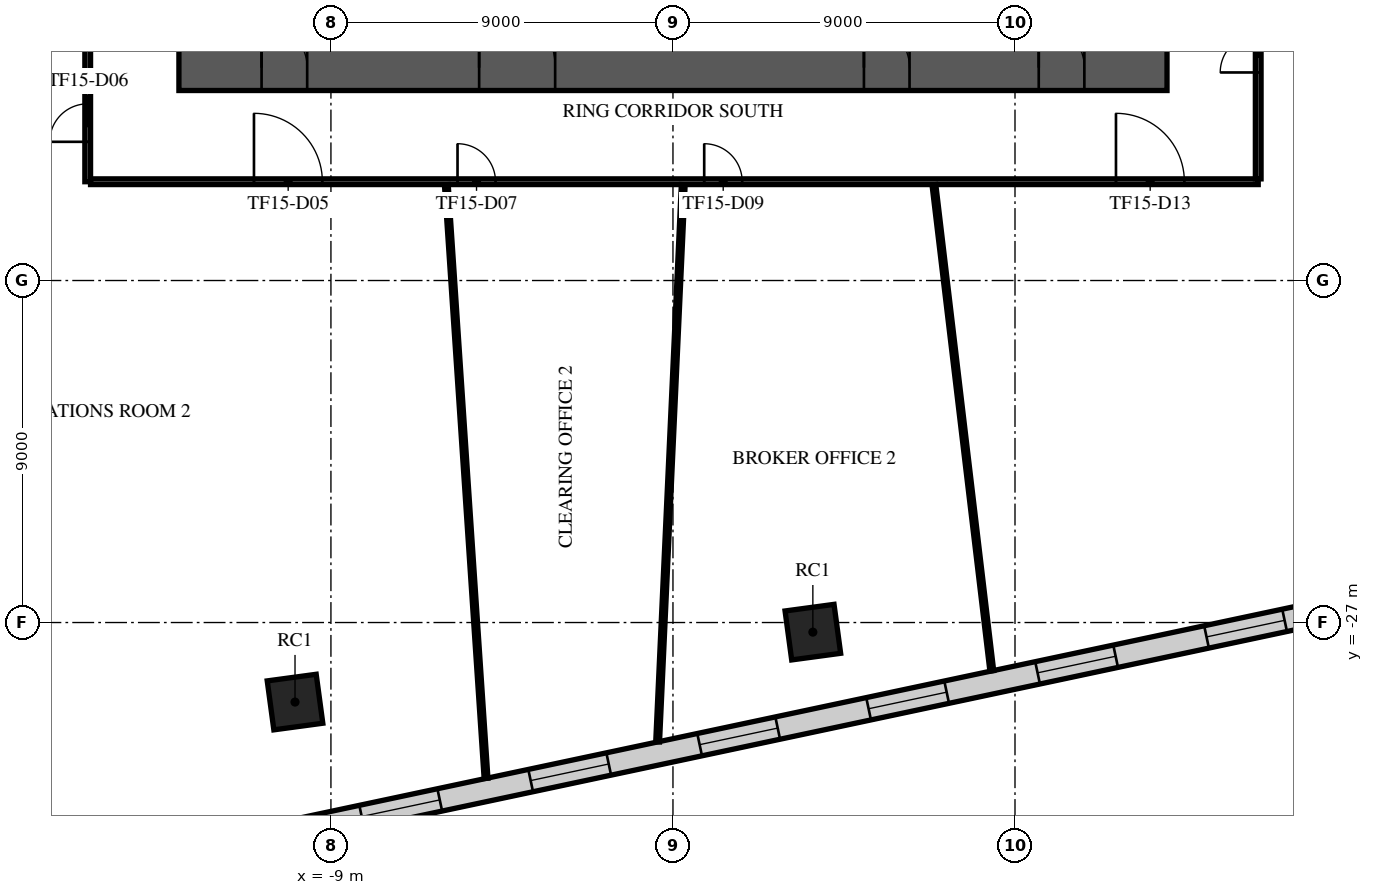
"""IFC4 building model, lengths in metres.
Left out: names, types, materials, properties, quantities, classifications, styles, units other than length and angle.
Written with IfcOpenShell. Run it as: python <this file> out.ifc"""

import sys

from ifc_helpers import new_model, si_unit, direction, frame, frame_2d, origin, origin_2d, place, context, subcontext, project, spatial, rectangle, extrude, element, fill, save


model = new_model("IFC4")
c1 = context("Model", 3, precision=1e-05, world=origin(), true_north=direction((0.0, 1.0)))
c2 = subcontext(c1, "Body", "Model", "MODEL_VIEW")
j1 = project(units=[si_unit("LENGTHUNIT", "METRE"), si_unit("PLANEANGLEUNIT", "RADIAN")], contexts=[c1])
p1 = place(None, origin())
s1 = spatial("IfcSite", under=j1, at=p1, CompositionType="ELEMENT")
p2 = place(p1, origin())
s2 = spatial("IfcBuilding", under=s1, at=p2, CompositionType="ELEMENT")
p3 = place(p2, frame((0.0, 0.0, 68.1)))
s3 = spatial("IfcBuildingStorey", under=s2, at=p3, CompositionType="ELEMENT", Elevation=68.1)
for number, where, z_axis, x_axis in (
    (1, (-9.945, -29.093, 0.0), (0.0, 0.0, 1.0), (0.991, 0.134, 0.0)),
    (2, (3.681, -27.253, 0.0), (0.0, 0.0, 1.0), (0.991, 0.134, 0.0)),
):
    element("IfcColumn", number, at=place(p3, frame(where, z_axis=z_axis, x_axis=x_axis)), inside=s3, PredefinedType="COLUMN", context=c2, shape_type="SweptSolid", body=[
        extrude(rectangle(XDim=1.3, YDim=1.3, at=origin_2d()), origin(), (0.0, 0.0, 1.0), 4.2),
    ])
p4 = place(p3, frame((-13.0, -12.4, 0.0), z_axis=(0.0, 0.0, 1.0), x_axis=(1.0, 0.0, 0.0)))
e3 = element("IfcWall", 3, at=p4, inside=s3, PredefinedType="SHEAR", context=c2, shape_type="SweptSolid", body=[
    extrude(rectangle(XDim=26.0, YDim=1.2, at=frame_2d((13.0, 0.0))), origin(), (0.0, 0.0, 1.0), 3.75),
])
p5 = place(p4, frame((7.9, 0.0, 0.0)))
e4 = element("IfcOpeningElement", 4, at=p5, cuts=e3, PredefinedType="OPENING", context=c2, shape_type="SweptSolid", body=[
    extrude(rectangle(XDim=2.0, YDim=2.1, at=frame_2d((1.0, 1.05))), frame((0.0, 0.61, 0.0), z_axis=(0.0, -1.0, 0.0), x_axis=(1.0, 0.0, 0.0)), (0.0, 0.0, 1.0), 1.22),
])
p6 = place(p4, frame((18.025, 0.0, 0.0)))
e5 = element("IfcOpeningElement", 5, at=p6, cuts=e3, PredefinedType="OPENING", context=c2, shape_type="SweptSolid", body=[
    extrude(rectangle(XDim=1.2, YDim=2.1, at=frame_2d((0.6, 1.05))), frame((0.0, 0.61, 0.0), z_axis=(0.0, -1.0, 0.0), x_axis=(1.0, 0.0, 0.0)), (0.0, 0.0, 1.0), 1.22),
])
p7 = place(p4, frame((2.175, 0.0, 0.0)))
e6 = element("IfcOpeningElement", 6, at=p7, cuts=e3, PredefinedType="OPENING", context=c2, shape_type="SweptSolid", body=[
    extrude(rectangle(XDim=1.2, YDim=2.1, at=frame_2d((0.6, 1.05))), frame((0.0, 0.61, 0.0), z_axis=(0.0, -1.0, 0.0), x_axis=(1.0, 0.0, 0.0)), (0.0, 0.0, 1.0), 1.22),
])
p8 = place(p4, frame((22.625, 0.0, 0.0)))
e7 = element("IfcOpeningElement", 7, at=p8, cuts=e3, PredefinedType="OPENING", context=c2, shape_type="SweptSolid", body=[
    extrude(rectangle(XDim=1.2, YDim=2.1, at=frame_2d((0.6, 1.05))), frame((0.0, 0.61, 0.0), z_axis=(0.0, -1.0, 0.0), x_axis=(1.0, 0.0, 0.0)), (0.0, 0.0, 1.0), 1.22),
])
p9 = place(p3, frame((-18.157, -34.223, 0.0), z_axis=(0.0, 0.0, 1.0), x_axis=(0.97814728825, 0.207913160934, 0.0)))
e8 = element("IfcWall", 8, at=p9, inside=s3, PredefinedType="STANDARD", context=c2, shape_type="SweptSolid", body=[
    extrude(rectangle(XDim=49.751, YDim=0.6, at=frame_2d((24.876, 0.0))), origin(), (0.0, 0.0, 1.0), 3.75),
])
p10 = place(p9, frame((1.161, 0.0, 0.9)))
e9 = element("IfcOpeningElement", 9, at=p10, cuts=e8, PredefinedType="OPENING", context=c2, shape_type="SweptSolid", body=[
    extrude(rectangle(XDim=2.1, YDim=2.1, at=frame_2d((1.05, 1.05))), frame((0.0, 0.31, 0.0), z_axis=(0.0, -1.0, 0.0), x_axis=(1.0, 0.0, 0.0)), (0.0, 0.0, 1.0), 0.62),
])
p11 = place(p9, frame((5.644, 0.0, 0.9)))
e10 = element("IfcOpeningElement", 10, at=p11, cuts=e8, PredefinedType="OPENING", context=c2, shape_type="SweptSolid", body=[
    extrude(rectangle(XDim=2.1, YDim=2.1, at=frame_2d((1.05, 1.05))), frame((0.0, 0.31, 0.0), z_axis=(0.0, -1.0, 0.0), x_axis=(1.0, 0.0, 0.0)), (0.0, 0.0, 1.0), 0.62),
])
p12 = place(p9, frame((10.189, 0.0, 0.9)))
e11 = element("IfcOpeningElement", 11, at=p12, cuts=e8, PredefinedType="OPENING", context=c2, shape_type="SweptSolid", body=[
    extrude(rectangle(XDim=2.1, YDim=2.1, at=frame_2d((1.05, 1.05))), frame((0.0, 0.31, 0.0), z_axis=(0.0, -1.0, 0.0), x_axis=(1.0, 0.0, 0.0)), (0.0, 0.0, 1.0), 0.62),
])
p13 = place(p9, frame((14.735, 0.0, 0.9)))
e12 = element("IfcOpeningElement", 12, at=p13, cuts=e8, PredefinedType="OPENING", context=c2, shape_type="SweptSolid", body=[
    extrude(rectangle(XDim=2.1, YDim=2.1, at=frame_2d((1.05, 1.05))), frame((0.0, 0.31, 0.0), z_axis=(0.0, -1.0, 0.0), x_axis=(1.0, 0.0, 0.0)), (0.0, 0.0, 1.0), 0.62),
])
p14 = place(p9, frame((19.28, 0.0, 0.9)))
e13 = element("IfcOpeningElement", 13, at=p14, cuts=e8, PredefinedType="OPENING", context=c2, shape_type="SweptSolid", body=[
    extrude(rectangle(XDim=2.1, YDim=2.1, at=frame_2d((1.05, 1.05))), frame((0.0, 0.31, 0.0), z_axis=(0.0, -1.0, 0.0), x_axis=(1.0, 0.0, 0.0)), (0.0, 0.0, 1.0), 0.62),
])
p15 = place(p9, frame((23.826, 0.0, 0.9)))
e14 = element("IfcOpeningElement", 14, at=p15, cuts=e8, PredefinedType="OPENING", context=c2, shape_type="SweptSolid", body=[
    extrude(rectangle(XDim=2.1, YDim=2.1, at=frame_2d((1.05, 1.05))), frame((0.0, 0.31, 0.0), z_axis=(0.0, -1.0, 0.0), x_axis=(1.0, 0.0, 0.0)), (0.0, 0.0, 1.0), 0.62),
])
p16 = place(p9, frame((28.371, 0.0, 0.9)))
e15 = element("IfcOpeningElement", 15, at=p16, cuts=e8, PredefinedType="OPENING", context=c2, shape_type="SweptSolid", body=[
    extrude(rectangle(XDim=2.1, YDim=2.1, at=frame_2d((1.05, 1.05))), frame((0.0, 0.31, 0.0), z_axis=(0.0, -1.0, 0.0), x_axis=(1.0, 0.0, 0.0)), (0.0, 0.0, 1.0), 0.62),
])
p17 = place(p9, frame((32.917, 0.0, 0.9)))
e16 = element("IfcOpeningElement", 16, at=p17, cuts=e8, PredefinedType="OPENING", context=c2, shape_type="SweptSolid", body=[
    extrude(rectangle(XDim=2.1, YDim=2.1, at=frame_2d((1.05, 1.05))), frame((0.0, 0.31, 0.0), z_axis=(0.0, -1.0, 0.0), x_axis=(1.0, 0.0, 0.0)), (0.0, 0.0, 1.0), 0.62),
])
p18 = place(p9, frame((37.462, 0.0, 0.9)))
e17 = element("IfcOpeningElement", 17, at=p18, cuts=e8, PredefinedType="OPENING", context=c2, shape_type="SweptSolid", body=[
    extrude(rectangle(XDim=2.1, YDim=2.1, at=frame_2d((1.05, 1.05))), frame((0.0, 0.31, 0.0), z_axis=(0.0, -1.0, 0.0), x_axis=(1.0, 0.0, 0.0)), (0.0, 0.0, 1.0), 0.62),
])
p19 = place(p9, frame((42.008, 0.0, 0.9)))
e18 = element("IfcOpeningElement", 18, at=p19, cuts=e8, PredefinedType="OPENING", context=c2, shape_type="SweptSolid", body=[
    extrude(rectangle(XDim=2.1, YDim=2.1, at=frame_2d((1.05, 1.05))), frame((0.0, 0.31, 0.0), z_axis=(0.0, -1.0, 0.0), x_axis=(1.0, 0.0, 0.0)), (0.0, 0.0, 1.0), 0.62),
])
p20 = place(p9, frame((46.491, 0.0, 0.9)))
e19 = element("IfcOpeningElement", 19, at=p20, cuts=e8, PredefinedType="OPENING", context=c2, shape_type="SweptSolid", body=[
    extrude(rectangle(XDim=2.1, YDim=2.1, at=frame_2d((1.05, 1.05))), frame((0.0, 0.31, 0.0), z_axis=(0.0, -1.0, 0.0), x_axis=(1.0, 0.0, 0.0)), (0.0, 0.0, 1.0), 0.62),
])
p21 = place(p3, frame((-15.4, -15.4, 0.0), z_axis=(0.0, 0.0, 1.0), x_axis=(0.0, 1.0, 0.0)))
e20 = element("IfcWall", 20, at=p21, inside=s3, PredefinedType="PARTITIONING", context=c2, shape_type="SweptSolid", body=[
    extrude(rectangle(XDim=30.8, YDim=0.15, at=frame_2d((15.4, 0.0))), origin(), (0.0, 0.0, 1.0), 3.25),
])
p22 = place(p21, frame((14.771, 0.0, 0.0)))
e21 = element("IfcOpeningElement", 21, at=p22, cuts=e20, PredefinedType="OPENING", context=c2, shape_type="SweptSolid", body=[
    extrude(rectangle(XDim=1.0, YDim=2.1, at=frame_2d((0.5, 1.05))), frame((0.0, 0.085, 0.0), z_axis=(0.0, -1.0, 0.0), x_axis=(1.0, 0.0, 0.0)), (0.0, 0.0, 1.0), 0.17),
])
p23 = place(p21, frame((11.897, 0.0, 0.0)))
e22 = element("IfcOpeningElement", 22, at=p23, cuts=e20, PredefinedType="OPENING", context=c2, shape_type="SweptSolid", body=[
    extrude(rectangle(XDim=1.0, YDim=2.1, at=frame_2d((0.5, 1.05))), frame((0.0, 0.085, 0.0), z_axis=(0.0, -1.0, 0.0), x_axis=(1.0, 0.0, 0.0)), (0.0, 0.0, 1.0), 0.17),
])
p24 = place(p21, frame((28.573, 0.0, 0.0)))
e23 = element("IfcOpeningElement", 23, at=p24, cuts=e20, PredefinedType="OPENING", context=c2, shape_type="SweptSolid", body=[
    extrude(rectangle(XDim=1.8, YDim=2.1, at=frame_2d((0.9, 1.05))), frame((0.0, 0.085, 0.0), z_axis=(0.0, -1.0, 0.0), x_axis=(1.0, 0.0, 0.0)), (0.0, 0.0, 1.0), 0.17),
])
p25 = place(p21, frame((24.323, 0.0, 0.0)))
e24 = element("IfcOpeningElement", 24, at=p25, cuts=e20, PredefinedType="OPENING", context=c2, shape_type="SweptSolid", body=[
    extrude(rectangle(XDim=1.0, YDim=2.1, at=frame_2d((0.5, 1.05))), frame((0.0, 0.085, 0.0), z_axis=(0.0, -1.0, 0.0), x_axis=(1.0, 0.0, 0.0)), (0.0, 0.0, 1.0), 0.17),
])
p26 = place(p21, frame((1.05, 0.0, 0.0)))
e25 = element("IfcOpeningElement", 25, at=p26, cuts=e20, PredefinedType="OPENING", context=c2, shape_type="SweptSolid", body=[
    extrude(rectangle(XDim=1.0, YDim=2.1, at=frame_2d((0.5, 1.05))), frame((0.0, 0.085, 0.0), z_axis=(0.0, -1.0, 0.0), x_axis=(1.0, 0.0, 0.0)), (0.0, 0.0, 1.0), 0.17),
])
p27 = place(p3, frame((-15.325, -15.4, 0.0), z_axis=(0.0, 0.0, 1.0), x_axis=(1.0, 0.0, 0.0)))
e26 = element("IfcWall", 26, at=p27, inside=s3, PredefinedType="PARTITIONING", context=c2, shape_type="SweptSolid", body=[
    extrude(rectangle(XDim=30.725, YDim=0.15, at=frame_2d((15.362, 0.0))), origin(), (0.0, 0.0, 1.0), 3.25),
])
p28 = place(p27, frame((4.3, 0.0, 0.0)))
e27 = element("IfcOpeningElement", 27, at=p28, cuts=e26, PredefinedType="OPENING", context=c2, shape_type="SweptSolid", body=[
    extrude(rectangle(XDim=1.8, YDim=2.1, at=frame_2d((0.9, 1.05))), frame((0.0, 0.085, 0.0), z_axis=(0.0, -1.0, 0.0), x_axis=(1.0, 0.0, 0.0)), (0.0, 0.0, 1.0), 0.17),
])
p29 = place(p27, frame((9.656, 0.0, 0.0)))
e28 = element("IfcOpeningElement", 28, at=p29, cuts=e26, PredefinedType="OPENING", context=c2, shape_type="SweptSolid", body=[
    extrude(rectangle(XDim=1.0, YDim=2.1, at=frame_2d((0.5, 1.05))), frame((0.0, 0.085, 0.0), z_axis=(0.0, -1.0, 0.0), x_axis=(1.0, 0.0, 0.0)), (0.0, 0.0, 1.0), 0.17),
])
p30 = place(p27, frame((16.147, 0.0, 0.0)))
e29 = element("IfcOpeningElement", 29, at=p30, cuts=e26, PredefinedType="OPENING", context=c2, shape_type="SweptSolid", body=[
    extrude(rectangle(XDim=1.0, YDim=2.1, at=frame_2d((0.5, 1.05))), frame((0.0, 0.085, 0.0), z_axis=(0.0, -1.0, 0.0), x_axis=(1.0, 0.0, 0.0)), (0.0, 0.0, 1.0), 0.17),
])
p31 = place(p27, frame((26.982, 0.0, 0.0)))
e30 = element("IfcOpeningElement", 30, at=p31, cuts=e26, PredefinedType="OPENING", context=c2, shape_type="SweptSolid", body=[
    extrude(rectangle(XDim=1.8, YDim=2.1, at=frame_2d((0.9, 1.05))), frame((0.0, 0.085, 0.0), z_axis=(0.0, -1.0, 0.0), x_axis=(1.0, 0.0, 0.0)), (0.0, 0.0, 1.0), 0.17),
])
p32 = place(p3, frame((15.4, -15.325, 0.0), z_axis=(0.0, 0.0, 1.0), x_axis=(0.0, 1.0, 0.0)))
e31 = element("IfcWall", 31, at=p32, inside=s3, PredefinedType="PARTITIONING", context=c2, shape_type="SweptSolid", body=[
    extrude(rectangle(XDim=30.65, YDim=0.15, at=frame_2d((15.325, 0.0))), origin(), (0.0, 0.0, 1.0), 3.25),
])
p33 = place(p32, frame((16.405, 0.0, 0.0)))
e32 = element("IfcOpeningElement", 32, at=p33, cuts=e31, PredefinedType="OPENING", context=c2, shape_type="SweptSolid", body=[
    extrude(rectangle(XDim=1.8, YDim=2.1, at=frame_2d((0.9, 1.05))), frame((0.0, 0.085, 0.0), z_axis=(0.0, -1.0, 0.0), x_axis=(1.0, 0.0, 0.0)), (0.0, 0.0, 1.0), 0.17),
])
p34 = place(p32, frame((23.905, 0.0, 0.0)))
e33 = element("IfcOpeningElement", 33, at=p34, cuts=e31, PredefinedType="OPENING", context=c2, shape_type="SweptSolid", body=[
    extrude(rectangle(XDim=1.0, YDim=2.1, at=frame_2d((0.5, 1.05))), frame((0.0, 0.085, 0.0), z_axis=(0.0, -1.0, 0.0), x_axis=(1.0, 0.0, 0.0)), (0.0, 0.0, 1.0), 0.17),
])
p35 = place(p32, frame((2.8, 0.0, 0.0)))
e34 = element("IfcOpeningElement", 34, at=p35, cuts=e31, PredefinedType="OPENING", context=c2, shape_type="SweptSolid", body=[
    extrude(rectangle(XDim=1.0, YDim=2.1, at=frame_2d((0.5, 1.05))), frame((0.0, 0.085, 0.0), z_axis=(0.0, -1.0, 0.0), x_axis=(1.0, 0.0, 0.0)), (0.0, 0.0, 1.0), 0.17),
])
p36 = place(p32, frame((5.455, 0.0, 0.0)))
e35 = element("IfcOpeningElement", 35, at=p36, cuts=e31, PredefinedType="OPENING", context=c2, shape_type="SweptSolid", body=[
    extrude(rectangle(XDim=1.8, YDim=2.1, at=frame_2d((0.9, 1.05))), frame((0.0, 0.085, 0.0), z_axis=(0.0, -1.0, 0.0), x_axis=(1.0, 0.0, 0.0)), (0.0, 0.0, 1.0), 0.17),
])
p37 = place(p32, frame((12.955, 0.0, 0.0)))
e36 = element("IfcOpeningElement", 36, at=p37, cuts=e31, PredefinedType="OPENING", context=c2, shape_type="SweptSolid", body=[
    extrude(rectangle(XDim=1.0, YDim=2.1, at=frame_2d((0.5, 1.05))), frame((0.0, 0.085, 0.0), z_axis=(0.0, -1.0, 0.0), x_axis=(1.0, 0.0, 0.0)), (0.0, 0.0, 1.0), 0.17),
])
p38 = place(p3, frame((-5.964, -15.478, 0.0), z_axis=(0.0, 0.0, 1.0), x_axis=(0.066754978286, -0.997769398646, 0.0)))
e37 = element("IfcWall", 37, at=p38, inside=s3, PredefinedType="PARTITIONING", context=c2, shape_type="SweptSolid", body=[
    extrude(rectangle(XDim=15.657, YDim=0.1, at=frame_2d((7.828, 0.0))), origin(), (0.0, 0.0, 1.0), 2.95),
])
p39 = place(p3, frame((-0.403, -30.14, 0.0), z_axis=(0.0, 0.0, 1.0), x_axis=(0.045905600383, 0.998945782239, 0.0)))
e38 = element("IfcWall", 38, at=p39, inside=s3, PredefinedType="PARTITIONING", context=c2, shape_type="SweptSolid", body=[
    extrude(rectangle(XDim=14.678, YDim=0.1, at=frame_2d((7.339, 0.0))), origin(), (0.0, 0.0, 1.0), 2.95),
])
p40 = place(p3, frame((6.867, -15.481, 0.0), z_axis=(0.0, 0.0, 1.0), x_axis=(0.118214669681, -0.992988062301, 0.0)))
e39 = element("IfcWall", 39, at=p40, inside=s3, PredefinedType="PARTITIONING", context=c2, shape_type="SweptSolid", body=[
    extrude(rectangle(XDim=12.881, YDim=0.1, at=frame_2d((6.44, 0.0))), origin(), (0.0, 0.0, 1.0), 2.95),
])
p41 = place(p5, origin())
e40 = element("IfcDoor", 40, at=p41, inside=s3, OperationType="SINGLE_SWING_LEFT", PredefinedType="DOOR", context=c2, shape_type="SweptSolid", body=[
    extrude(rectangle(XDim=2.0, YDim=2.1, at=frame_2d((1.0, 1.05))), frame((0.0, 0.025, 0.0), z_axis=(0.0, -1.0, 0.0), x_axis=(1.0, 0.0, 0.0)), (0.0, 0.0, 1.0), 0.05),
])
fill(e4, e40)
p42 = place(p6, origin())
e41 = element("IfcDoor", 41, at=p42, inside=s3, OperationType="SINGLE_SWING_LEFT", PredefinedType="DOOR", context=c2, shape_type="SweptSolid", body=[
    extrude(rectangle(XDim=1.2, YDim=2.1, at=frame_2d((0.6, 1.05))), frame((0.0, 0.025, 0.0), z_axis=(0.0, -1.0, 0.0), x_axis=(1.0, 0.0, 0.0)), (0.0, 0.0, 1.0), 0.05),
])
fill(e5, e41)
p43 = place(p7, origin())
e42 = element("IfcDoor", 42, at=p43, inside=s3, OperationType="SINGLE_SWING_LEFT", PredefinedType="DOOR", context=c2, shape_type="SweptSolid", body=[
    extrude(rectangle(XDim=1.2, YDim=2.1, at=frame_2d((0.6, 1.05))), frame((0.0, 0.025, 0.0), z_axis=(0.0, -1.0, 0.0), x_axis=(1.0, 0.0, 0.0)), (0.0, 0.0, 1.0), 0.05),
])
fill(e6, e42)
p44 = place(p8, origin())
e43 = element("IfcDoor", 43, at=p44, inside=s3, OperationType="SINGLE_SWING_LEFT", PredefinedType="DOOR", context=c2, shape_type="SweptSolid", body=[
    extrude(rectangle(XDim=1.2, YDim=2.1, at=frame_2d((0.6, 1.05))), frame((0.0, 0.025, 0.0), z_axis=(0.0, -1.0, 0.0), x_axis=(1.0, 0.0, 0.0)), (0.0, 0.0, 1.0), 0.05),
])
fill(e7, e43)
p45 = place(p12, origin())
e44 = element("IfcWindow", 44, at=p45, inside=s3, PartitioningType="SINGLE_PANEL", PredefinedType="WINDOW", context=c2, shape_type="SweptSolid", body=[
    extrude(rectangle(XDim=2.1, YDim=2.1, at=frame_2d((1.05, 1.05))), frame((0.0, 0.03, 0.0), z_axis=(0.0, -1.0, 0.0), x_axis=(1.0, 0.0, 0.0)), (0.0, 0.0, 1.0), 0.06),
])
fill(e11, e44)
p46 = place(p13, origin())
e45 = element("IfcWindow", 45, at=p46, inside=s3, PartitioningType="SINGLE_PANEL", PredefinedType="WINDOW", context=c2, shape_type="SweptSolid", body=[
    extrude(rectangle(XDim=2.1, YDim=2.1, at=frame_2d((1.05, 1.05))), frame((0.0, 0.03, 0.0), z_axis=(0.0, -1.0, 0.0), x_axis=(1.0, 0.0, 0.0)), (0.0, 0.0, 1.0), 0.06),
])
fill(e12, e45)
p47 = place(p14, origin())
e46 = element("IfcWindow", 46, at=p47, inside=s3, PartitioningType="SINGLE_PANEL", PredefinedType="WINDOW", context=c2, shape_type="SweptSolid", body=[
    extrude(rectangle(XDim=2.1, YDim=2.1, at=frame_2d((1.05, 1.05))), frame((0.0, 0.03, 0.0), z_axis=(0.0, -1.0, 0.0), x_axis=(1.0, 0.0, 0.0)), (0.0, 0.0, 1.0), 0.06),
])
fill(e13, e46)
p48 = place(p15, origin())
e47 = element("IfcWindow", 47, at=p48, inside=s3, PartitioningType="SINGLE_PANEL", PredefinedType="WINDOW", context=c2, shape_type="SweptSolid", body=[
    extrude(rectangle(XDim=2.1, YDim=2.1, at=frame_2d((1.05, 1.05))), frame((0.0, 0.03, 0.0), z_axis=(0.0, -1.0, 0.0), x_axis=(1.0, 0.0, 0.0)), (0.0, 0.0, 1.0), 0.06),
])
fill(e14, e47)
p49 = place(p16, origin())
e48 = element("IfcWindow", 48, at=p49, inside=s3, PartitioningType="SINGLE_PANEL", PredefinedType="WINDOW", context=c2, shape_type="SweptSolid", body=[
    extrude(rectangle(XDim=2.1, YDim=2.1, at=frame_2d((1.05, 1.05))), frame((0.0, 0.03, 0.0), z_axis=(0.0, -1.0, 0.0), x_axis=(1.0, 0.0, 0.0)), (0.0, 0.0, 1.0), 0.06),
])
fill(e15, e48)
p50 = place(p17, origin())
e49 = element("IfcWindow", 49, at=p50, inside=s3, PartitioningType="SINGLE_PANEL", PredefinedType="WINDOW", context=c2, shape_type="SweptSolid", body=[
    extrude(rectangle(XDim=2.1, YDim=2.1, at=frame_2d((1.05, 1.05))), frame((0.0, 0.03, 0.0), z_axis=(0.0, -1.0, 0.0), x_axis=(1.0, 0.0, 0.0)), (0.0, 0.0, 1.0), 0.06),
])
fill(e16, e49)
p51 = place(p28, frame((1.8, 0.0, 0.0), z_axis=(0.0, 0.0, 1.0), x_axis=(-1.0, 0.0, 0.0)))
e50 = element("IfcDoor", 50, at=p51, inside=s3, OperationType="DOUBLE_DOOR_SINGLE_SWING", PredefinedType="DOOR", context=c2, shape_type="SweptSolid", body=[
    extrude(rectangle(XDim=1.8, YDim=2.1, at=frame_2d((0.9, 1.05))), frame((0.0, 0.025, 0.0), z_axis=(0.0, -1.0, 0.0), x_axis=(1.0, 0.0, 0.0)), (0.0, 0.0, 1.0), 0.05),
])
fill(e27, e50)
p52 = place(p26, origin())
e51 = element("IfcDoor", 51, at=p52, inside=s3, OperationType="SINGLE_SWING_RIGHT", PredefinedType="DOOR", context=c2, shape_type="SweptSolid", body=[
    extrude(rectangle(XDim=1.0, YDim=2.1, at=frame_2d((0.5, 1.05))), frame((0.0, 0.025, 0.0), z_axis=(0.0, -1.0, 0.0), x_axis=(1.0, 0.0, 0.0)), (0.0, 0.0, 1.0), 0.05),
])
fill(e25, e51)
p53 = place(p29, frame((1.0, 0.0, 0.0), z_axis=(0.0, 0.0, 1.0), x_axis=(-1.0, 0.0, 0.0)))
e52 = element("IfcDoor", 52, at=p53, inside=s3, OperationType="SINGLE_SWING_LEFT", PredefinedType="DOOR", context=c2, shape_type="SweptSolid", body=[
    extrude(rectangle(XDim=1.0, YDim=2.1, at=frame_2d((0.5, 1.05))), frame((0.0, 0.025, 0.0), z_axis=(0.0, -1.0, 0.0), x_axis=(1.0, 0.0, 0.0)), (0.0, 0.0, 1.0), 0.05),
])
fill(e28, e52)
p54 = place(p30, frame((1.0, 0.0, 0.0), z_axis=(0.0, 0.0, 1.0), x_axis=(-1.0, 0.0, 0.0)))
e53 = element("IfcDoor", 53, at=p54, inside=s3, OperationType="SINGLE_SWING_LEFT", PredefinedType="DOOR", context=c2, shape_type="SweptSolid", body=[
    extrude(rectangle(XDim=1.0, YDim=2.1, at=frame_2d((0.5, 1.05))), frame((0.0, 0.025, 0.0), z_axis=(0.0, -1.0, 0.0), x_axis=(1.0, 0.0, 0.0)), (0.0, 0.0, 1.0), 0.05),
])
fill(e29, e53)
p55 = place(p31, frame((1.8, 0.0, 0.0), z_axis=(0.0, 0.0, 1.0), x_axis=(-1.0, 0.0, 0.0)))
e54 = element("IfcDoor", 54, at=p55, inside=s3, OperationType="DOUBLE_DOOR_SINGLE_SWING", PredefinedType="DOOR", context=c2, shape_type="SweptSolid", body=[
    extrude(rectangle(XDim=1.8, YDim=2.1, at=frame_2d((0.9, 1.05))), frame((0.0, 0.025, 0.0), z_axis=(0.0, -1.0, 0.0), x_axis=(1.0, 0.0, 0.0)), (0.0, 0.0, 1.0), 0.05),
])
fill(e30, e54)
p56 = place(p35, frame((1.0, 0.0, 0.0), z_axis=(0.0, 0.0, 1.0), x_axis=(-1.0, 0.0, 0.0)))
e55 = element("IfcDoor", 55, at=p56, inside=s3, OperationType="SINGLE_SWING_LEFT", PredefinedType="DOOR", context=c2, shape_type="SweptSolid", body=[
    extrude(rectangle(XDim=1.0, YDim=2.1, at=frame_2d((0.5, 1.05))), frame((0.0, 0.025, 0.0), z_axis=(0.0, -1.0, 0.0), x_axis=(1.0, 0.0, 0.0)), (0.0, 0.0, 1.0), 0.05),
])
fill(e34, e55)
save(model, sys.argv[1])
